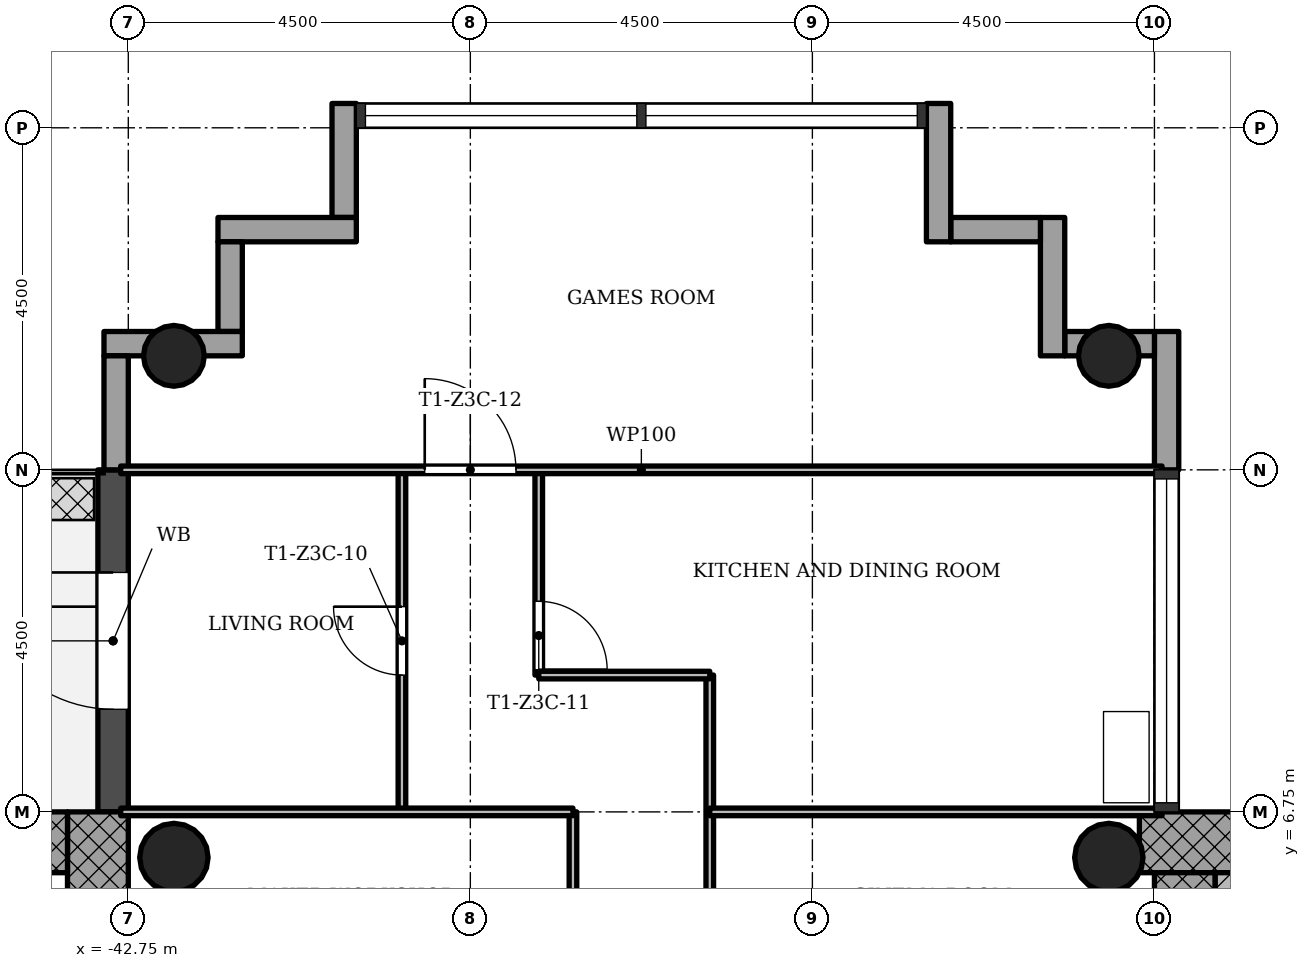
"""IFC4 building model, lengths in metres.
Left out: names, types, materials, properties, quantities, classifications, styles, units other than length and angle.
Written with IfcOpenShell. Run it as: python <this file> out.ifc"""

import sys

from ifc_helpers import new_model, si_unit, direction, frame, frame_2d, origin, origin_2d, place, context, subcontext, project, spatial, rectangle, hollow_circle, extrude, element, fill, save


model = new_model("IFC4")
c1 = context("Model", 3, precision=1e-05, world=origin(), true_north=direction((0.0, 1.0)))
c2 = subcontext(c1, "Body", "Model", "MODEL_VIEW")
j1 = project(units=[si_unit("LENGTHUNIT", "METRE"), si_unit("PLANEANGLEUNIT", "RADIAN")], contexts=[c1])
p1 = place(None, origin())
s1 = spatial("IfcSite", under=j1, at=p1, CompositionType="ELEMENT")
p2 = place(p1, origin())
s2 = spatial("IfcBuilding", under=s1, at=p2, CompositionType="ELEMENT")
p3 = place(p2, frame((0.0, 0.0, 154.1)))
s3 = spatial("IfcBuildingStorey", under=s2, at=p3, CompositionType="ELEMENT", Elevation=154.1)
p4 = place(p3, frame((-20.652, 6.35, 0.0), z_axis=(0.0, 0.0, 1.0), x_axis=(-1.0, 0.0, 0.0)))
e1 = element("IfcWall", 1, at=p4, inside=s3, PredefinedType="SHEAR", context=c2, shape_type="SweptSolid", body=[
    extrude(rectangle(XDim=8.796, YDim=0.8, at=frame_2d((4.398, 0.0))), origin(), (0.0, 0.0, 1.0), 3.4),
])
p5 = place(p3, frame((-28.85, 5.95, 0.0), z_axis=(0.0, 0.0, 1.0), x_axis=(0.0, -1.0, 0.0)))
e2 = element("IfcWall", 2, at=p5, inside=s3, PredefinedType="SHEAR", context=c2, shape_type="SweptSolid", body=[
    extrude(rectangle(XDim=12.7, YDim=0.8, at=frame_2d((6.35, 0.0))), origin(), (0.0, 0.0, 1.0), 3.4),
])
p6 = place(p5, frame((5.05, 0.0, 0.0)))
e3 = element("IfcOpeningElement", 3, at=p6, cuts=e2, PredefinedType="OPENING", context=c2, shape_type="SweptSolid", body=[
    extrude(rectangle(XDim=1.8, YDim=2.1, at=frame_2d((0.9, 1.05))), frame((0.0, 0.41, 0.0), z_axis=(0.0, -1.0, 0.0), x_axis=(1.0, 0.0, 0.0)), (0.0, 0.0, 1.0), 0.82),
])
p7 = place(p3, frame((-43.15, -5.95, 0.0), z_axis=(0.0, 0.0, 1.0), x_axis=(0.0, 1.0, 0.0)))
e4 = element("IfcWall", 4, at=p7, inside=s3, PredefinedType="SHEAR", context=c2, shape_type="SweptSolid", body=[
    extrude(rectangle(XDim=12.7, YDim=0.8, at=frame_2d((6.35, 0.0))), origin(), (0.0, 0.0, 1.0), 3.4),
])
p8 = place(p7, frame((5.05, 0.0, 0.0)))
e5 = element("IfcOpeningElement", 5, at=p8, cuts=e4, PredefinedType="OPENING", context=c2, shape_type="SweptSolid", body=[
    extrude(rectangle(XDim=1.8, YDim=2.1, at=frame_2d((0.9, 1.05))), frame((0.0, 0.41, 0.0), z_axis=(0.0, -1.0, 0.0), x_axis=(1.0, 0.0, 0.0)), (0.0, 0.0, 1.0), 0.82),
])
p9 = place(p3, frame((-43.55, 6.35, 0.0), z_axis=(0.0, 0.0, 1.0), x_axis=(-1.0, 0.0, 0.0)))
e6 = element("IfcWall", 6, at=p9, inside=s3, PredefinedType="SHEAR", context=c2, shape_type="SweptSolid", body=[
    extrude(rectangle(XDim=8.2, YDim=0.8, at=frame_2d((4.1, 0.0))), origin(), (0.0, 0.0, 1.0), 3.4),
])
for number, where, z_axis, x_axis in (
    (7, (-29.85, 12.75, 0.0), (0.0, 0.0, 1.0), (1.0, 0.0, 0.0)),
    (8, (-42.15, 12.75, 0.0), (0.0, 0.0, 1.0), (1.0, 0.0, 0.0)),
):
    element("IfcColumn", number, at=place(p3, frame(where, z_axis=z_axis, x_axis=x_axis)), inside=s3, PredefinedType="COLUMN", context=c2, shape_type="SweptSolid", body=[
        extrude(hollow_circle(Radius=0.4, WallThickness=0.028, at=origin_2d()), origin(), (0.0, 0.0, 1.0), 3.4),
    ])
for number, where, z_axis, x_axis in (
    (9, (-29.85, 6.15, 0.0), (0.0, 0.0, 1.0), (1.0, 0.0, 0.0)),
    (10, (-42.15, 6.15, 0.0), (0.0, 0.0, 1.0), (1.0, 0.0, 0.0)),
):
    element("IfcColumn", number, at=place(p3, frame(where, z_axis=z_axis, x_axis=x_axis)), inside=s3, PredefinedType="COLUMN", context=c2, shape_type="SweptSolid", body=[
        extrude(hollow_circle(Radius=0.45, WallThickness=0.032, at=origin_2d()), origin(), (0.0, 0.0, 1.0), 3.4),
    ])
p10 = place(p3, frame((-29.09, 11.25, -0.3), z_axis=(0.0, 0.0, 1.0), x_axis=(0.0, 1.0, 0.0)))
e11 = element("IfcWall", 11, at=p10, inside=s3, PredefinedType="STANDARD", context=c2, shape_type="SweptSolid", body=[
    extrude(rectangle(XDim=1.82, YDim=0.32, at=frame_2d((0.91, 0.0))), origin(), (0.0, 0.0, 1.0), 3.4),
])
p11 = place(p3, frame((-29.25, 12.91, -0.3), z_axis=(0.0, 0.0, 1.0), x_axis=(-1.0, 0.0, 0.0)))
e12 = element("IfcWall", 12, at=p11, inside=s3, PredefinedType="STANDARD", context=c2, shape_type="SweptSolid", body=[
    extrude(rectangle(XDim=1.18, YDim=0.32, at=frame_2d((0.59, 0.0))), origin(), (0.0, 0.0, 1.0), 3.4),
])
p12 = place(p3, frame((-30.59, 12.75, -0.3), z_axis=(0.0, 0.0, 1.0), x_axis=(0.0, 1.0, 0.0)))
e13 = element("IfcWall", 13, at=p12, inside=s3, PredefinedType="STANDARD", context=c2, shape_type="SweptSolid", body=[
    extrude(rectangle(XDim=1.82, YDim=0.32, at=frame_2d((0.91, 0.0))), origin(), (0.0, 0.0, 1.0), 3.4),
])
p13 = place(p3, frame((-30.75, 14.41, -0.3), z_axis=(0.0, 0.0, 1.0), x_axis=(-1.0, 0.0, 0.0)))
e14 = element("IfcWall", 14, at=p13, inside=s3, PredefinedType="STANDARD", context=c2, shape_type="SweptSolid", body=[
    extrude(rectangle(XDim=1.18, YDim=0.32, at=frame_2d((0.59, 0.0))), origin(), (0.0, 0.0, 1.0), 3.4),
])
p14 = place(p3, frame((-32.09, 14.25, -0.3), z_axis=(0.0, 0.0, 1.0), x_axis=(0.0, 1.0, 0.0)))
e15 = element("IfcWall", 15, at=p14, inside=s3, PredefinedType="STANDARD", context=c2, shape_type="SweptSolid", body=[
    extrude(rectangle(XDim=1.82, YDim=0.32, at=frame_2d((0.91, 0.0))), origin(), (0.0, 0.0, 1.0), 3.4),
])
p15 = place(p3, frame((-39.91, 16.07, -0.3), z_axis=(0.0, 0.0, 1.0), x_axis=(0.0, -1.0, 0.0)))
e16 = element("IfcWall", 16, at=p15, inside=s3, PredefinedType="STANDARD", context=c2, shape_type="SweptSolid", body=[
    extrude(rectangle(XDim=1.5, YDim=0.32, at=frame_2d((0.75, 0.0))), origin(), (0.0, 0.0, 1.0), 3.4),
])
p16 = place(p3, frame((-39.75, 14.41, -0.3), z_axis=(0.0, 0.0, 1.0), x_axis=(-1.0, 0.0, 0.0)))
e17 = element("IfcWall", 17, at=p16, inside=s3, PredefinedType="STANDARD", context=c2, shape_type="SweptSolid", body=[
    extrude(rectangle(XDim=1.82, YDim=0.32, at=frame_2d((0.91, 0.0))), origin(), (0.0, 0.0, 1.0), 3.4),
])
p17 = place(p3, frame((-41.41, 14.25, -0.3), z_axis=(0.0, 0.0, 1.0), x_axis=(0.0, -1.0, 0.0)))
e18 = element("IfcWall", 18, at=p17, inside=s3, PredefinedType="STANDARD", context=c2, shape_type="SweptSolid", body=[
    extrude(rectangle(XDim=1.18, YDim=0.32, at=frame_2d((0.59, 0.0))), origin(), (0.0, 0.0, 1.0), 3.4),
])
p18 = place(p3, frame((-41.25, 12.91, -0.3), z_axis=(0.0, 0.0, 1.0), x_axis=(-1.0, 0.0, 0.0)))
e19 = element("IfcWall", 19, at=p18, inside=s3, PredefinedType="STANDARD", context=c2, shape_type="SweptSolid", body=[
    extrude(rectangle(XDim=1.82, YDim=0.32, at=frame_2d((0.91, 0.0))), origin(), (0.0, 0.0, 1.0), 3.4),
])
p19 = place(p3, frame((-42.91, 12.75, -0.3), z_axis=(0.0, 0.0, 1.0), x_axis=(0.0, -1.0, 0.0)))
e20 = element("IfcWall", 20, at=p19, inside=s3, PredefinedType="STANDARD", context=c2, shape_type="SweptSolid", body=[
    extrude(rectangle(XDim=1.5, YDim=0.32, at=frame_2d((0.75, 0.0))), origin(), (0.0, 0.0, 1.0), 3.4),
])
p20 = place(p3, frame((-42.95, 11.25, -0.02), z_axis=(0.0, 0.0, 1.0), x_axis=(0.0, -1.0, 0.0)))
e21 = element("IfcWall", 21, at=p20, inside=s3, PredefinedType="STANDARD", context=c2, shape_type="SweptSolid", body=[
    extrude(rectangle(XDim=4.5, YDim=0.4, at=frame_2d((2.25, 0.0))), origin(), (0.0, 0.0, 1.0), 3.12),
])
p21 = place(p20, frame((1.35, 0.0, 0.02)))
e22 = element("IfcOpeningElement", 22, at=p21, cuts=e21, PredefinedType="OPENING", context=c2, shape_type="SweptSolid", body=[
    extrude(rectangle(XDim=1.8, YDim=2.1, at=frame_2d((0.9, 1.05))), frame((0.0, 0.21, 0.0), z_axis=(0.0, -1.0, 0.0), x_axis=(1.0, 0.0, 0.0)), (0.0, 0.0, 1.0), 0.42),
])
p22 = place(p3, frame((-39.15, 6.75, 0.0), z_axis=(0.0, 0.0, 1.0), x_axis=(0.0, 1.0, 0.0)))
e23 = element("IfcWall", 23, at=p22, inside=s3, PredefinedType="PARTITIONING", context=c2, shape_type="SweptSolid", body=[
    extrude(rectangle(XDim=4.5, YDim=0.1, at=frame_2d((2.25, 0.0))), origin(), (0.0, 0.0, 1.0), 3.0),
])
p23 = place(p22, frame((1.8, 0.0, 0.0)))
e24 = element("IfcOpeningElement", 24, at=p23, cuts=e23, PredefinedType="OPENING", context=c2, shape_type="SweptSolid", body=[
    extrude(rectangle(XDim=0.9, YDim=2.1, at=frame_2d((0.45, 1.05))), frame((0.0, 0.06, 0.0), z_axis=(0.0, -1.0, 0.0), x_axis=(1.0, 0.0, 0.0)), (0.0, 0.0, 1.0), 0.12),
])
p24 = place(p3, frame((-37.35, 8.55, 0.0), z_axis=(0.0, 0.0, 1.0), x_axis=(0.0, 1.0, 0.0)))
e25 = element("IfcWall", 25, at=p24, inside=s3, PredefinedType="PARTITIONING", context=c2, shape_type="SweptSolid", body=[
    extrude(rectangle(XDim=2.7, YDim=0.1, at=frame_2d((1.35, 0.0))), origin(), (0.0, 0.0, 1.0), 3.0),
])
p25 = place(p24, frame((0.07, 0.0, 0.0)))
e26 = element("IfcOpeningElement", 26, at=p25, cuts=e25, PredefinedType="OPENING", context=c2, shape_type="SweptSolid", body=[
    extrude(rectangle(XDim=0.9, YDim=2.1, at=frame_2d((0.45, 1.05))), frame((0.0, 0.06, 0.0), z_axis=(0.0, -1.0, 0.0), x_axis=(1.0, 0.0, 0.0)), (0.0, 0.0, 1.0), 0.12),
])
p26 = place(p3, frame((-36.9, 4.5, 0.0), z_axis=(0.0, 0.0, 1.0), x_axis=(0.0, 1.0, 0.0)))
e27 = element("IfcWall", 27, at=p26, inside=s3, PredefinedType="PARTITIONING", context=c2, shape_type="SweptSolid", body=[
    extrude(rectangle(XDim=2.25, YDim=0.1, at=frame_2d((1.125, 0.0))), origin(), (0.0, 0.0, 1.0), 3.0),
])
p27 = place(p3, frame((-35.1, 4.5, 0.0), z_axis=(0.0, 0.0, 1.0), x_axis=(0.0, 1.0, 0.0)))
e28 = element("IfcWall", 28, at=p27, inside=s3, PredefinedType="PARTITIONING", context=c2, shape_type="SweptSolid", body=[
    extrude(rectangle(XDim=4.05, YDim=0.1, at=frame_2d((2.025, 0.0))), origin(), (0.0, 0.0, 1.0), 3.0),
])
for number, where, z_axis, x_axis in (
    (29, (-42.85, 6.75, 0.0), (0.0, 0.0, 1.0), (1.0, 0.0, 0.0)),
    (30, (-35.1, 6.75, 0.0), (0.0, 0.0, 1.0), (1.0, 0.0, 0.0)),
):
    element("IfcWall", number, at=place(p3, frame(where, z_axis=z_axis, x_axis=x_axis)), inside=s3, PredefinedType="PARTITIONING", context=c2, shape_type="SweptSolid", body=[
        extrude(rectangle(XDim=5.95, YDim=0.1, at=frame_2d((2.975, 0.0))), origin(), (0.0, 0.0, 1.0), 3.0),
    ])
p28 = place(p3, frame((-37.35, 8.55, 0.0), z_axis=(0.0, 0.0, 1.0), x_axis=(1.0, 0.0, 0.0)))
e31 = element("IfcWall", 31, at=p28, inside=s3, PredefinedType="PARTITIONING", context=c2, shape_type="SweptSolid", body=[
    extrude(rectangle(XDim=2.25, YDim=0.1, at=frame_2d((1.125, 0.0))), origin(), (0.0, 0.0, 1.0), 3.0),
])
p29 = place(p3, frame((-42.85, 11.25, 0.0), z_axis=(0.0, 0.0, 1.0), x_axis=(1.0, 0.0, 0.0)))
e32 = element("IfcWall", 32, at=p29, inside=s3, PredefinedType="PARTITIONING", context=c2, shape_type="SweptSolid", body=[
    extrude(rectangle(XDim=13.7, YDim=0.1, at=frame_2d((6.85, 0.0))), origin(), (0.0, 0.0, 1.0), 3.0),
])
p30 = place(p29, frame((4.0, 0.0, 0.0)))
e33 = element("IfcOpeningElement", 33, at=p30, cuts=e32, PredefinedType="OPENING", context=c2, shape_type="SweptSolid", body=[
    extrude(rectangle(XDim=1.2, YDim=2.1, at=frame_2d((0.6, 1.05))), frame((0.0, 0.06, 0.0), z_axis=(0.0, -1.0, 0.0), x_axis=(1.0, 0.0, 0.0)), (0.0, 0.0, 1.0), 0.12),
])
p31 = place(p3, frame((-28.25, 1.85, 0.0), z_axis=(0.0, 0.0, 1.0), x_axis=(0.0, 1.0, 0.0)))
e34 = element("IfcWall", 34, at=p31, inside=s3, PredefinedType="SHEAR", context=c2, shape_type="SweptSolid", body=[
    extrude(rectangle(XDim=4.1, YDim=0.4, at=frame_2d((2.05, 0.0))), origin(), (0.0, 0.0, 1.0), 3.4),
])
p32 = place(p21, origin())
e35 = element("IfcDoor", 35, at=p32, inside=s3, OperationType="SINGLE_SWING_LEFT", PredefinedType="DOOR", context=c2, shape_type="SweptSolid", body=[
    extrude(rectangle(XDim=1.8, YDim=2.1, at=frame_2d((0.9, 1.05))), frame((0.0, 0.025, 0.0), z_axis=(0.0, -1.0, 0.0), x_axis=(1.0, 0.0, 0.0)), (0.0, 0.0, 1.0), 0.05),
])
fill(e22, e35)
p33 = place(p23, origin())
e36 = element("IfcDoor", 36, at=p33, inside=s3, OperationType="SINGLE_SWING_LEFT", PredefinedType="DOOR", context=c2, shape_type="SweptSolid", body=[
    extrude(rectangle(XDim=0.9, YDim=2.1, at=frame_2d((0.45, 1.05))), frame((0.0, 0.025, 0.0), z_axis=(0.0, -1.0, 0.0), x_axis=(1.0, 0.0, 0.0)), (0.0, 0.0, 1.0), 0.05),
])
fill(e24, e36)
p34 = place(p25, origin())
e37 = element("IfcDoor", 37, at=p34, inside=s3, OperationType="SINGLE_SWING_LEFT", PredefinedType="DOOR", context=c2, shape_type="SweptSolid", body=[
    extrude(rectangle(XDim=0.9, YDim=2.1, at=frame_2d((0.45, 1.05))), frame((0.0, 0.025, 0.0), z_axis=(0.0, -1.0, 0.0), x_axis=(1.0, 0.0, 0.0)), (0.0, 0.0, 1.0), 0.05),
])
fill(e26, e37)
p35 = place(p30, origin())
e38 = element("IfcDoor", 38, at=p35, inside=s3, OperationType="SINGLE_SWING_RIGHT", PredefinedType="DOOR", context=c2, shape_type="SweptSolid", body=[
    extrude(rectangle(XDim=1.2, YDim=2.1, at=frame_2d((0.6, 1.05))), frame((0.0, 0.025, 0.0), z_axis=(0.0, -1.0, 0.0), x_axis=(1.0, 0.0, 0.0)), (0.0, 0.0, 1.0), 0.05),
])
fill(e33, e38)
save(model, sys.argv[1])
